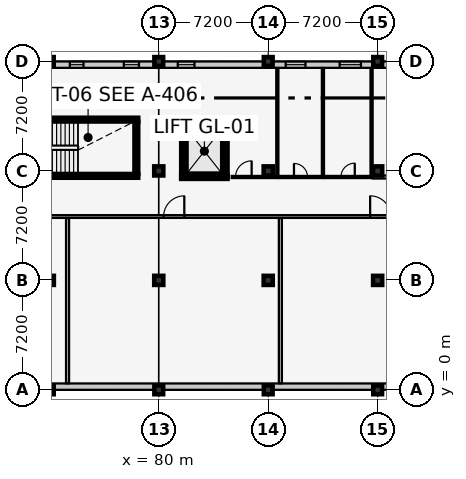
"""IFC4 building model, lengths in metres.
Left out: names, types, materials, properties, quantities, classifications, styles, units other than length and angle.
Written with IfcOpenShell. Run it as: python <this file> out.ifc"""

import sys

from ifc_helpers import new_model, si_unit, direction, frame, frame_2d, origin, origin_2d, place, context, subcontext, project, spatial, rectangle, extrude, element, fill, save


model = new_model("IFC4")
c1 = context("Model", 3, precision=1e-05, world=origin(), true_north=direction((0.0, 1.0)))
c2 = subcontext(c1, "Body", "Model", "MODEL_VIEW")
j1 = project(units=[si_unit("LENGTHUNIT", "METRE"), si_unit("PLANEANGLEUNIT", "RADIAN")], contexts=[c1])
p1 = place(None, origin())
s1 = spatial("IfcSite", under=j1, at=p1, CompositionType="ELEMENT")
p2 = place(p1, origin())
s2 = spatial("IfcBuilding", under=s1, at=p2, CompositionType="ELEMENT")
p3 = place(p2, frame((0.0, 0.0, 9.6)))
s3 = spatial("IfcBuildingStorey", under=s2, at=p3, CompositionType="ELEMENT", Elevation=9.6)
p4 = place(p3, frame((72.8, 0.0, 0.0), z_axis=(0.0, 0.0, 1.0), x_axis=(1.0, 0.0, 0.0)))
e1 = element("IfcColumn", 1, at=p4, inside=s3, PredefinedType="COLUMN", context=c2, shape_type="SweptSolid", body=[
    extrude(rectangle(XDim=0.58, YDim=0.58, at=origin_2d()), origin(), (0.0, 0.0, 1.0), 4.2),
])
p5 = place(p3, frame((72.8, 7.2, 0.0), z_axis=(0.0, 0.0, 1.0), x_axis=(1.0, 0.0, 0.0)))
e2 = element("IfcColumn", 2, at=p5, inside=s3, PredefinedType="COLUMN", context=c2, shape_type="SweptSolid", body=[
    extrude(rectangle(XDim=0.6, YDim=0.6, at=origin_2d()), origin(), (0.0, 0.0, 1.0), 4.2),
])
for number, where, z_axis, x_axis in (
    (3, (72.8, 21.6, 0.0), (0.0, 0.0, 1.0), (1.0, 0.0, 0.0)),
    (4, (80.0, 0.0, 0.0), (0.0, 0.0, 1.0), (1.0, 0.0, 0.0)),
):
    element("IfcColumn", number, at=place(p3, frame(where, z_axis=z_axis, x_axis=x_axis)), inside=s3, PredefinedType="COLUMN", context=c2, shape_type="SweptSolid", body=[
        extrude(rectangle(XDim=0.58, YDim=0.58, at=origin_2d()), origin(), (0.0, 0.0, 1.0), 4.2),
    ])
for number, where, z_axis, x_axis in (
    (5, (80.0, 7.2, 0.0), (0.0, 0.0, 1.0), (1.0, 0.0, 0.0)),
    (6, (80.0, 14.4, 0.0), (0.0, 0.0, 1.0), (1.0, 0.0, 0.0)),
):
    element("IfcColumn", number, at=place(p3, frame(where, z_axis=z_axis, x_axis=x_axis)), inside=s3, PredefinedType="COLUMN", context=c2, shape_type="SweptSolid", body=[
        extrude(rectangle(XDim=0.6, YDim=0.6, at=origin_2d()), origin(), (0.0, 0.0, 1.0), 4.2),
    ])
for number, where, z_axis, x_axis in (
    (7, (80.0, 21.6, 0.0), (0.0, 0.0, 1.0), (1.0, 0.0, 0.0)),
    (8, (87.2, 0.0, 0.0), (0.0, 0.0, 1.0), (1.0, 0.0, 0.0)),
):
    element("IfcColumn", number, at=place(p3, frame(where, z_axis=z_axis, x_axis=x_axis)), inside=s3, PredefinedType="COLUMN", context=c2, shape_type="SweptSolid", body=[
        extrude(rectangle(XDim=0.58, YDim=0.58, at=origin_2d()), origin(), (0.0, 0.0, 1.0), 4.2),
    ])
for number, where, z_axis, x_axis in (
    (9, (87.2, 7.2, 0.0), (0.0, 0.0, 1.0), (1.0, 0.0, 0.0)),
    (10, (87.2, 14.4, 0.0), (0.0, 0.0, 1.0), (1.0, 0.0, 0.0)),
):
    element("IfcColumn", number, at=place(p3, frame(where, z_axis=z_axis, x_axis=x_axis)), inside=s3, PredefinedType="COLUMN", context=c2, shape_type="SweptSolid", body=[
        extrude(rectangle(XDim=0.6, YDim=0.6, at=origin_2d()), origin(), (0.0, 0.0, 1.0), 4.2),
    ])
for number, where, z_axis, x_axis in (
    (11, (87.2, 21.6, 0.0), (0.0, 0.0, 1.0), (1.0, 0.0, 0.0)),
    (12, (94.4, 0.0, 0.0), (0.0, 0.0, 1.0), (1.0, 0.0, 0.0)),
):
    element("IfcColumn", number, at=place(p3, frame(where, z_axis=z_axis, x_axis=x_axis)), inside=s3, PredefinedType="COLUMN", context=c2, shape_type="SweptSolid", body=[
        extrude(rectangle(XDim=0.58, YDim=0.58, at=origin_2d()), origin(), (0.0, 0.0, 1.0), 4.2),
    ])
for number, where, z_axis, x_axis in (
    (13, (94.4, 7.2, 0.0), (0.0, 0.0, 1.0), (1.0, 0.0, 0.0)),
    (14, (94.4, 14.4, 0.0), (0.0, 0.0, 1.0), (1.0, 0.0, 0.0)),
):
    element("IfcColumn", number, at=place(p3, frame(where, z_axis=z_axis, x_axis=x_axis)), inside=s3, PredefinedType="COLUMN", context=c2, shape_type="SweptSolid", body=[
        extrude(rectangle(XDim=0.6, YDim=0.6, at=origin_2d()), origin(), (0.0, 0.0, 1.0), 4.2),
    ])
p6 = place(p3, frame((94.4, 21.6, 0.0), z_axis=(0.0, 0.0, 1.0), x_axis=(1.0, 0.0, 0.0)))
e15 = element("IfcColumn", 15, at=p6, inside=s3, PredefinedType="COLUMN", context=c2, shape_type="SweptSolid", body=[
    extrude(rectangle(XDim=0.58, YDim=0.58, at=origin_2d()), origin(), (0.0, 0.0, 1.0), 4.2),
])
p7 = place(p3, frame((101.6, 0.21, 0.0), z_axis=(0.0, 0.0, 1.0), x_axis=(-1.0, 0.0, 0.0)))
e16 = element("IfcWall", 16, at=p7, inside=s3, PredefinedType="SOLIDWALL", context=c2, shape_type="SweptSolid", body=[
    extrude(rectangle(XDim=43.2, YDim=0.42, at=frame_2d((21.6, 0.0))), origin(), (0.0, 0.0, 1.0), 3.255),
])
p8 = place(p3, frame((58.4, 21.39, 0.0), z_axis=(0.0, 0.0, 1.0), x_axis=(1.0, 0.0, 0.0)))
e17 = element("IfcWall", 17, at=p8, inside=s3, PredefinedType="SOLIDWALL", context=c2, shape_type="SweptSolid", body=[
    extrude(rectangle(XDim=43.2, YDim=0.42, at=frame_2d((21.6, 0.0))), origin(), (0.0, 0.0, 1.0), 3.255),
])
p9 = place(p8, frame((1.18, 0.0, 0.9)))
e18 = element("IfcOpeningElement", 18, at=p9, cuts=e17, PredefinedType="OPENING", context=c2, shape_type="SweptSolid", body=[
    extrude(rectangle(XDim=1.24, YDim=1.75, at=frame_2d((0.62, 0.875))), frame((0.0, 0.222, 0.0), z_axis=(0.0, -1.0, 0.0), x_axis=(1.0, 0.0, 0.0)), (0.0, 0.0, 1.0), 0.444),
])
p10 = place(p8, frame((4.73, 0.0, 0.9)))
e19 = element("IfcOpeningElement", 19, at=p10, cuts=e17, PredefinedType="OPENING", context=c2, shape_type="SweptSolid", body=[
    extrude(rectangle(XDim=1.34, YDim=1.75, at=frame_2d((0.67, 0.875))), frame((0.0, 0.222, 0.0), z_axis=(0.0, -1.0, 0.0), x_axis=(1.0, 0.0, 0.0)), (0.0, 0.0, 1.0), 0.444),
])
p11 = place(p8, frame((8.28, 0.0, 0.9)))
e20 = element("IfcOpeningElement", 20, at=p11, cuts=e17, PredefinedType="OPENING", context=c2, shape_type="SweptSolid", body=[
    extrude(rectangle(XDim=1.44, YDim=1.75, at=frame_2d((0.72, 0.875))), frame((0.0, 0.222, 0.0), z_axis=(0.0, -1.0, 0.0), x_axis=(1.0, 0.0, 0.0)), (0.0, 0.0, 1.0), 0.444),
])
p12 = place(p8, frame((15.75, 0.0, 0.9)))
e21 = element("IfcOpeningElement", 21, at=p12, cuts=e17, PredefinedType="OPENING", context=c2, shape_type="SweptSolid", body=[
    extrude(rectangle(XDim=0.9, YDim=1.35, at=frame_2d((0.45, 0.675))), frame((0.0, 0.222, 0.0), z_axis=(0.0, -1.0, 0.0), x_axis=(1.0, 0.0, 0.0)), (0.0, 0.0, 1.0), 0.444),
])
p13 = place(p8, frame((19.3, 0.0, 0.9)))
e22 = element("IfcOpeningElement", 22, at=p13, cuts=e17, PredefinedType="OPENING", context=c2, shape_type="SweptSolid", body=[
    extrude(rectangle(XDim=1.0, YDim=1.35, at=frame_2d((0.5, 0.675))), frame((0.0, 0.222, 0.0), z_axis=(0.0, -1.0, 0.0), x_axis=(1.0, 0.0, 0.0)), (0.0, 0.0, 1.0), 0.444),
])
p14 = place(p8, frame((22.85, 0.0, 0.9)))
e23 = element("IfcOpeningElement", 23, at=p14, cuts=e17, PredefinedType="OPENING", context=c2, shape_type="SweptSolid", body=[
    extrude(rectangle(XDim=1.1, YDim=1.35, at=frame_2d((0.55, 0.675))), frame((0.0, 0.222, 0.0), z_axis=(0.0, -1.0, 0.0), x_axis=(1.0, 0.0, 0.0)), (0.0, 0.0, 1.0), 0.444),
])
p15 = place(p8, frame((29.95, 0.0, 0.9)))
e24 = element("IfcOpeningElement", 24, at=p15, cuts=e17, PredefinedType="OPENING", context=c2, shape_type="SweptSolid", body=[
    extrude(rectangle(XDim=1.3, YDim=1.35, at=frame_2d((0.65, 0.675))), frame((0.0, 0.222, 0.0), z_axis=(0.0, -1.0, 0.0), x_axis=(1.0, 0.0, 0.0)), (0.0, 0.0, 1.0), 0.444),
])
p16 = place(p8, frame((33.5, 0.0, 0.9)))
e25 = element("IfcOpeningElement", 25, at=p16, cuts=e17, PredefinedType="OPENING", context=c2, shape_type="SweptSolid", body=[
    extrude(rectangle(XDim=1.4, YDim=1.35, at=frame_2d((0.7, 0.675))), frame((0.0, 0.222, 0.0), z_axis=(0.0, -1.0, 0.0), x_axis=(1.0, 0.0, 0.0)), (0.0, 0.0, 1.0), 0.444),
])
p17 = place(p8, frame((37.325, 0.0, 0.9)))
e26 = element("IfcOpeningElement", 26, at=p17, cuts=e17, PredefinedType="OPENING", context=c2, shape_type="SweptSolid", body=[
    extrude(rectangle(XDim=0.95, YDim=1.45, at=frame_2d((0.475, 0.725))), frame((0.0, 0.222, 0.0), z_axis=(0.0, -1.0, 0.0), x_axis=(1.0, 0.0, 0.0)), (0.0, 0.0, 1.0), 0.444),
])
p18 = place(p8, frame((40.875, 0.0, 0.9)))
e27 = element("IfcOpeningElement", 27, at=p18, cuts=e17, PredefinedType="OPENING", context=c2, shape_type="SweptSolid", body=[
    extrude(rectangle(XDim=1.05, YDim=1.45, at=frame_2d((0.525, 0.725))), frame((0.0, 0.222, 0.0), z_axis=(0.0, -1.0, 0.0), x_axis=(1.0, 0.0, 0.0)), (0.0, 0.0, 1.0), 0.444),
])
for number, where, z_axis, x_axis in (
    (28, (69.75, 14.075, 0.0), (0.0, 0.0, 1.0), (1.0, 0.0, 0.0)),
    (29, (78.65, 17.775, 0.0), (0.0, 0.0, 1.0), (-1.0, 0.0, 0.0)),
):
    element("IfcWall", number, at=place(p3, frame(where, z_axis=z_axis, x_axis=x_axis)), inside=s3, PredefinedType="SHEAR", context=c2, shape_type="SweptSolid", body=[
        extrude(rectangle(XDim=8.9, YDim=0.25, at=frame_2d((4.45, 0.0))), origin(), (0.0, 0.0, 1.0), 3.96),
    ])
p19 = place(p3, frame((78.525, 14.2, 0.0), z_axis=(0.0, 0.0, 1.0), x_axis=(0.0, 1.0, 0.0)))
e30 = element("IfcWall", 30, at=p19, inside=s3, PredefinedType="SHEAR", context=c2, shape_type="SweptSolid", body=[
    extrude(rectangle(XDim=3.45, YDim=0.25, at=frame_2d((1.725, 0.0))), origin(), (0.0, 0.0, 1.0), 3.96),
])
p20 = place(p3, frame((81.475, 14.0, 0.0), z_axis=(0.0, 0.0, 1.0), x_axis=(1.0, 0.0, 0.0)))
e31 = element("IfcWall", 31, at=p20, inside=s3, PredefinedType="SHEAR", context=c2, shape_type="SweptSolid", body=[
    extrude(rectangle(XDim=3.05, YDim=0.25, at=frame_2d((1.525, 0.0))), origin(), (0.0, 0.0, 1.0), 3.96),
])
p21 = place(p20, frame((0.725, 0.0, 0.0)))
e32 = element("IfcOpeningElement", 32, at=p21, cuts=e31, PredefinedType="OPENING", context=c2, shape_type="SweptSolid", body=[
    extrude(rectangle(XDim=1.6, YDim=2.3, at=frame_2d((0.8, 1.15))), frame((0.0, 0.137, 0.0), z_axis=(0.0, -1.0, 0.0), x_axis=(1.0, 0.0, 0.0)), (0.0, 0.0, 1.0), 0.274),
])
p22 = place(p3, frame((84.525, 17.4, 0.0), z_axis=(0.0, 0.0, 1.0), x_axis=(-1.0, 0.0, 0.0)))
e33 = element("IfcWall", 33, at=p22, inside=s3, PredefinedType="SHEAR", context=c2, shape_type="SweptSolid", body=[
    extrude(rectangle(XDim=3.05, YDim=0.25, at=frame_2d((1.525, 0.0))), origin(), (0.0, 0.0, 1.0), 3.96),
])
for number, where, z_axis, x_axis in (
    (34, (81.6, 17.4, 0.0), (0.0, 0.0, 1.0), (0.0, -1.0, 0.0)),
    (35, (84.4, 14.0, 0.0), (0.0, 0.0, 1.0), (0.0, 1.0, 0.0)),
):
    element("IfcWall", number, at=place(p3, frame(where, z_axis=z_axis, x_axis=x_axis)), inside=s3, PredefinedType="SHEAR", context=c2, shape_type="SweptSolid", body=[
        extrude(rectangle(XDim=3.4, YDim=0.25, at=frame_2d((1.7, 0.0))), origin(), (0.0, 0.0, 1.0), 3.96),
    ])
p23 = place(p3, frame((58.83, 11.4, 0.0), z_axis=(0.0, 0.0, 1.0), x_axis=(1.0, 0.0, 0.0)))
e36 = element("IfcWall", 36, at=p23, inside=s3, PredefinedType="PARTITIONING", context=c2, shape_type="SweptSolid", body=[
    extrude(rectangle(XDim=42.34, YDim=0.18, at=frame_2d((21.17, 0.0))), origin(), (0.0, 0.0, 1.0), 3.96),
])
p24 = place(p23, frame((6.905, 0.0, 0.0)))
e37 = element("IfcOpeningElement", 37, at=p24, cuts=e36, PredefinedType="OPENING", context=c2, shape_type="SweptSolid", body=[
    extrude(rectangle(XDim=1.36, YDim=2.2, at=frame_2d((0.68, 1.1))), frame((0.0, 0.102, 0.0), z_axis=(0.0, -1.0, 0.0), x_axis=(1.0, 0.0, 0.0)), (0.0, 0.0, 1.0), 0.204),
])
p25 = place(p23, frame((21.49, 0.0, 0.0)))
e38 = element("IfcOpeningElement", 38, at=p25, cuts=e36, PredefinedType="OPENING", context=c2, shape_type="SweptSolid", body=[
    extrude(rectangle(XDim=1.36, YDim=2.2, at=frame_2d((0.68, 1.1))), frame((0.0, 0.102, 0.0), z_axis=(0.0, -1.0, 0.0), x_axis=(1.0, 0.0, 0.0)), (0.0, 0.0, 1.0), 0.204),
])
p26 = place(p23, frame((35.075, 0.0, 0.0)))
e39 = element("IfcOpeningElement", 39, at=p26, cuts=e36, PredefinedType="OPENING", context=c2, shape_type="SweptSolid", body=[
    extrude(rectangle(XDim=1.36, YDim=2.2, at=frame_2d((0.68, 1.1))), frame((0.0, 0.102, 0.0), z_axis=(0.0, -1.0, 0.0), x_axis=(1.0, 0.0, 0.0)), (0.0, 0.0, 1.0), 0.204),
])
for number, where, z_axis, x_axis in (
    (40, (74.0, 0.43, 0.0), (0.0, 0.0, 1.0), (0.0, 1.0, 0.0)),
    (41, (88.0, 0.43, 0.0), (0.0, 0.0, 1.0), (0.0, 1.0, 0.0)),
):
    element("IfcWall", number, at=place(p3, frame(where, z_axis=z_axis, x_axis=x_axis)), inside=s3, PredefinedType="PARTITIONING", context=c2, shape_type="SweptSolid", body=[
        extrude(rectangle(XDim=10.87, YDim=0.2, at=frame_2d((5.435, 0.0))), origin(), (0.0, 0.0, 1.0), 3.96),
    ])
p27 = place(p3, frame((84.8, 14.0, 0.0), z_axis=(0.0, 0.0, 1.0), x_axis=(1.0, 0.0, 0.0)))
e42 = element("IfcWall", 42, at=p27, inside=s3, PredefinedType="PARTITIONING", context=c2, shape_type="SweptSolid", body=[
    extrude(rectangle(XDim=3.0, YDim=0.14, at=frame_2d((1.5, 0.0))), origin(), (0.0, 0.0, 1.0), 3.96),
])
p28 = place(p27, frame((0.25, 0.0, 0.0)))
e43 = element("IfcOpeningElement", 43, at=p28, cuts=e42, PredefinedType="OPENING", context=c2, shape_type="SweptSolid", body=[
    extrude(rectangle(XDim=1.06, YDim=2.1, at=frame_2d((0.53, 1.05))), frame((0.0, 0.082, 0.0), z_axis=(0.0, -1.0, 0.0), x_axis=(1.0, 0.0, 0.0)), (0.0, 0.0, 1.0), 0.164),
])
p29 = place(p3, frame((87.8, 14.08, 0.0), z_axis=(0.0, 0.0, 1.0), x_axis=(0.0, 1.0, 0.0)))
e44 = element("IfcWall", 44, at=p29, inside=s3, PredefinedType="PARTITIONING", context=c2, shape_type="SweptSolid", body=[
    extrude(rectangle(XDim=7.09, YDim=0.14, at=frame_2d((3.545, 0.0))), origin(), (0.0, 0.0, 1.0), 3.96),
])
p30 = place(p3, frame((87.88, 14.0, 0.0), z_axis=(0.0, 0.0, 1.0), x_axis=(1.0, 0.0, 0.0)))
e45 = element("IfcWall", 45, at=p30, inside=s3, PredefinedType="PARTITIONING", context=c2, shape_type="SweptSolid", body=[
    extrude(rectangle(XDim=2.92, YDim=0.14, at=frame_2d((1.46, 0.0))), origin(), (0.0, 0.0, 1.0), 3.96),
])
p31 = place(p30, frame((1.015, 0.0, 0.0)))
e46 = element("IfcOpeningElement", 46, at=p31, cuts=e45, PredefinedType="OPENING", context=c2, shape_type="SweptSolid", body=[
    extrude(rectangle(XDim=0.89, YDim=2.05, at=frame_2d((0.445, 1.025))), frame((0.0, 0.082, 0.0), z_axis=(0.0, -1.0, 0.0), x_axis=(1.0, 0.0, 0.0)), (0.0, 0.0, 1.0), 0.164),
])
p32 = place(p3, frame((90.8, 14.08, 0.0), z_axis=(0.0, 0.0, 1.0), x_axis=(0.0, 1.0, 0.0)))
e47 = element("IfcWall", 47, at=p32, inside=s3, PredefinedType="PARTITIONING", context=c2, shape_type="SweptSolid", body=[
    extrude(rectangle(XDim=7.09, YDim=0.14, at=frame_2d((3.545, 0.0))), origin(), (0.0, 0.0, 1.0), 3.745),
])
p33 = place(p3, frame((90.88, 14.0, 0.0), z_axis=(0.0, 0.0, 1.0), x_axis=(1.0, 0.0, 0.0)))
e48 = element("IfcWall", 48, at=p33, inside=s3, PredefinedType="PARTITIONING", context=c2, shape_type="SweptSolid", body=[
    extrude(rectangle(XDim=3.12, YDim=0.14, at=frame_2d((1.56, 0.0))), origin(), (0.0, 0.0, 1.0), 3.96),
])
p34 = place(p33, frame((1.105, 0.0, 0.0)))
e49 = element("IfcOpeningElement", 49, at=p34, cuts=e48, PredefinedType="OPENING", context=c2, shape_type="SweptSolid", body=[
    extrude(rectangle(XDim=0.91, YDim=2.06, at=frame_2d((0.455, 1.03))), frame((0.0, 0.082, 0.0), z_axis=(0.0, -1.0, 0.0), x_axis=(1.0, 0.0, 0.0)), (0.0, 0.0, 1.0), 0.164),
])
p35 = place(p3, frame((94.0, 14.08, 0.0), z_axis=(0.0, 0.0, 1.0), x_axis=(0.0, 1.0, 0.0)))
e50 = element("IfcWall", 50, at=p35, inside=s3, PredefinedType="PARTITIONING", context=c2, shape_type="SweptSolid", body=[
    extrude(rectangle(XDim=7.09, YDim=0.14, at=frame_2d((3.545, 0.0))), origin(), (0.0, 0.0, 1.0), 3.96),
])
p36 = place(p3, frame((94.08, 14.0, 0.0), z_axis=(0.0, 0.0, 1.0), x_axis=(1.0, 0.0, 0.0)))
e51 = element("IfcWall", 51, at=p36, inside=s3, PredefinedType="PARTITIONING", context=c2, shape_type="SweptSolid", body=[
    extrude(rectangle(XDim=7.09, YDim=0.2, at=frame_2d((3.545, 0.0))), origin(), (0.0, 0.0, 1.0), 3.96),
])
p37 = place(p36, frame((2.885, 0.0, 0.0)))
e52 = element("IfcOpeningElement", 52, at=p37, cuts=e51, PredefinedType="OPENING", context=c2, shape_type="SweptSolid", body=[
    extrude(rectangle(XDim=1.32, YDim=2.15, at=frame_2d((0.66, 1.075))), frame((0.0, 0.112, 0.0), z_axis=(0.0, -1.0, 0.0), x_axis=(1.0, 0.0, 0.0)), (0.0, 0.0, 1.0), 0.224),
])
p38 = place(p12, origin())
e53 = element("IfcWindow", 53, at=p38, inside=s3, PartitioningType="SINGLE_PANEL", PredefinedType="WINDOW", context=c2, shape_type="SweptSolid", body=[
    extrude(rectangle(XDim=0.9, YDim=1.35, at=frame_2d((0.45, 0.675))), frame((0.0, 0.03, 0.0), z_axis=(0.0, -1.0, 0.0), x_axis=(1.0, 0.0, 0.0)), (0.0, 0.0, 1.0), 0.06),
])
fill(e21, e53)
p39 = place(p13, origin())
e54 = element("IfcWindow", 54, at=p39, inside=s3, PartitioningType="SINGLE_PANEL", PredefinedType="WINDOW", context=c2, shape_type="SweptSolid", body=[
    extrude(rectangle(XDim=1.0, YDim=1.35, at=frame_2d((0.5, 0.675))), frame((0.0, 0.03, 0.0), z_axis=(0.0, -1.0, 0.0), x_axis=(1.0, 0.0, 0.0)), (0.0, 0.0, 1.0), 0.06),
])
fill(e22, e54)
p40 = place(p14, origin())
e55 = element("IfcWindow", 55, at=p40, inside=s3, PartitioningType="SINGLE_PANEL", PredefinedType="WINDOW", context=c2, shape_type="SweptSolid", body=[
    extrude(rectangle(XDim=1.1, YDim=1.35, at=frame_2d((0.55, 0.675))), frame((0.0, 0.03, 0.0), z_axis=(0.0, -1.0, 0.0), x_axis=(1.0, 0.0, 0.0)), (0.0, 0.0, 1.0), 0.06),
])
fill(e23, e55)
p41 = place(p15, origin())
e56 = element("IfcWindow", 56, at=p41, inside=s3, PartitioningType="SINGLE_PANEL", PredefinedType="WINDOW", context=c2, shape_type="SweptSolid", body=[
    extrude(rectangle(XDim=1.3, YDim=1.35, at=frame_2d((0.65, 0.675))), frame((0.0, 0.03, 0.0), z_axis=(0.0, -1.0, 0.0), x_axis=(1.0, 0.0, 0.0)), (0.0, 0.0, 1.0), 0.06),
])
fill(e24, e56)
p42 = place(p16, origin())
e57 = element("IfcWindow", 57, at=p42, inside=s3, PartitioningType="SINGLE_PANEL", PredefinedType="WINDOW", context=c2, shape_type="SweptSolid", body=[
    extrude(rectangle(XDim=1.4, YDim=1.35, at=frame_2d((0.7, 0.675))), frame((0.0, 0.03, 0.0), z_axis=(0.0, -1.0, 0.0), x_axis=(1.0, 0.0, 0.0)), (0.0, 0.0, 1.0), 0.06),
])
fill(e25, e57)
p43 = place(p21, origin())
e58 = element("IfcDoor", 58, at=p43, inside=s3, OperationType="DOUBLE_DOOR_SLIDING", PredefinedType="DOOR", context=c2, shape_type="SweptSolid", body=[
    extrude(rectangle(XDim=1.6, YDim=2.3, at=frame_2d((0.8, 1.15))), frame((0.0, 0.025, 0.0), z_axis=(0.0, -1.0, 0.0), x_axis=(1.0, 0.0, 0.0)), (0.0, 0.0, 1.0), 0.05),
])
fill(e32, e58)
p44 = place(p25, origin())
e59 = element("IfcDoor", 59, at=p44, inside=s3, OperationType="SINGLE_SWING_RIGHT", PredefinedType="DOOR", context=c2, shape_type="SweptSolid", body=[
    extrude(rectangle(XDim=1.36, YDim=2.2, at=frame_2d((0.68, 1.1))), frame((0.0, 0.025, 0.0), z_axis=(0.0, -1.0, 0.0), x_axis=(1.0, 0.0, 0.0)), (0.0, 0.0, 1.0), 0.05),
])
fill(e38, e59)
p45 = place(p26, origin())
e60 = element("IfcDoor", 60, at=p45, inside=s3, OperationType="SINGLE_SWING_LEFT", PredefinedType="DOOR", context=c2, shape_type="SweptSolid", body=[
    extrude(rectangle(XDim=1.36, YDim=2.2, at=frame_2d((0.68, 1.1))), frame((0.0, 0.025, 0.0), z_axis=(0.0, -1.0, 0.0), x_axis=(1.0, 0.0, 0.0)), (0.0, 0.0, 1.0), 0.05),
])
fill(e39, e60)
p46 = place(p28, origin())
e61 = element("IfcDoor", 61, at=p46, inside=s3, OperationType="SINGLE_SWING_RIGHT", PredefinedType="DOOR", context=c2, shape_type="SweptSolid", body=[
    extrude(rectangle(XDim=1.06, YDim=2.1, at=frame_2d((0.53, 1.05))), frame((0.0, 0.025, 0.0), z_axis=(0.0, -1.0, 0.0), x_axis=(1.0, 0.0, 0.0)), (0.0, 0.0, 1.0), 0.05),
])
fill(e43, e61)
p47 = place(p31, origin())
e62 = element("IfcDoor", 62, at=p47, inside=s3, OperationType="SINGLE_SWING_LEFT", PredefinedType="DOOR", context=c2, shape_type="SweptSolid", body=[
    extrude(rectangle(XDim=0.89, YDim=2.05, at=frame_2d((0.445, 1.025))), frame((0.0, 0.025, 0.0), z_axis=(0.0, -1.0, 0.0), x_axis=(1.0, 0.0, 0.0)), (0.0, 0.0, 1.0), 0.05),
])
fill(e46, e62)
p48 = place(p34, origin())
e63 = element("IfcDoor", 63, at=p48, inside=s3, OperationType="SINGLE_SWING_RIGHT", PredefinedType="DOOR", context=c2, shape_type="SweptSolid", body=[
    extrude(rectangle(XDim=0.91, YDim=2.06, at=frame_2d((0.455, 1.03))), frame((0.0, 0.025, 0.0), z_axis=(0.0, -1.0, 0.0), x_axis=(1.0, 0.0, 0.0)), (0.0, 0.0, 1.0), 0.05),
])
fill(e49, e63)
save(model, sys.argv[1])
